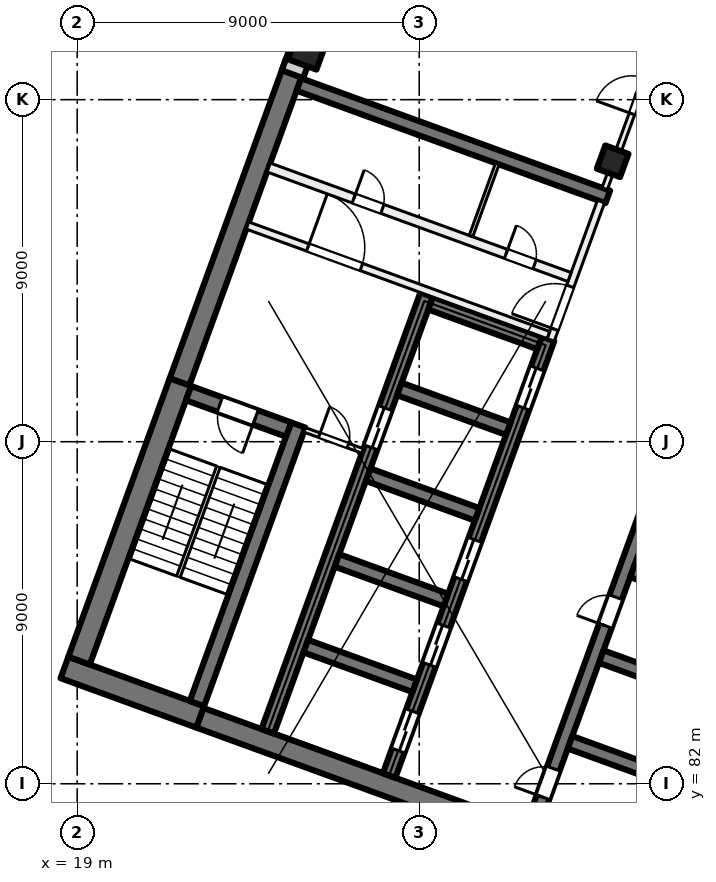
"""IFC4 building model, lengths in metres.
Left out: names, types, materials, properties, quantities, classifications, styles, units other than length and angle.
Written with IfcOpenShell. Run it as: python <this file> out.ifc"""

import sys

from ifc_helpers import new_model, si_unit, direction, frame, frame_2d, origin, origin_2d, place, context, subcontext, project, spatial, rectangle, extrude, element, fill, save


model = new_model("IFC4")
c1 = context("Model", 3, precision=1e-05, world=origin(), true_north=direction((0.0, 1.0)))
c2 = subcontext(c1, "Body", "Model", "MODEL_VIEW")
j1 = project(units=[si_unit("LENGTHUNIT", "METRE"), si_unit("PLANEANGLEUNIT", "RADIAN")], contexts=[c1])
p1 = place(None, origin())
s1 = spatial("IfcSite", under=j1, at=p1, CompositionType="ELEMENT")
p2 = place(p1, origin())
s2 = spatial("IfcBuilding", under=s1, at=p2, CompositionType="ELEMENT")
p3 = place(p2, frame((0.0, 0.0, 134.5)))
s3 = spatial("IfcBuildingStorey", under=s2, at=p3, CompositionType="ELEMENT", Elevation=134.5)
p4 = place(p3, frame((33.091, 98.379, 0.0), z_axis=(0.0, 0.0, 1.0), x_axis=(-0.342020143326, -0.939692620786, 0.0)))
e1 = element("IfcColumn", 1, at=p4, inside=s3, PredefinedType="COLUMN", context=c2, shape_type="SweptSolid", body=[
    extrude(rectangle(XDim=0.65, YDim=0.65, at=origin_2d()), origin(), (0.0, 0.0, 1.0), 4.0),
])
p5 = place(p3, frame((25.056, 101.303, 0.0), z_axis=(0.0, 0.0, 1.0), x_axis=(-0.342020143326, -0.939692620786, 0.0)))
e2 = element("IfcColumn", 2, at=p5, inside=s3, PredefinedType="COLUMN", context=c2, shape_type="SweptSolid", body=[
    extrude(rectangle(XDim=0.8, YDim=0.8, at=origin_2d()), origin(), (0.0, 0.0, 1.0), 4.0),
])
p6 = place(p3, frame((35.759, 78.811, 0.0), z_axis=(0.0, 0.0, 1.0), x_axis=(-0.939692894512, 0.342019391267, 0.0)))
e3 = element("IfcWall", 3, at=p6, inside=s3, PredefinedType="SHEAR", context=c2, shape_type="SweptSolid", body=[
    extrude(rectangle(XDim=14.4, YDim=0.55, at=frame_2d((7.2, 0.0))), origin(), (0.0, 0.0, 1.0), 4.0),
])
p7 = place(p3, frame((22.236, 83.76, 0.0), z_axis=(0.0, 0.0, 1.0), x_axis=(-0.939680822529, 0.342052557032, 0.0)))
e4 = element("IfcWall", 4, at=p7, inside=s3, PredefinedType="SHEAR", context=c2, shape_type="SweptSolid", body=[
    extrude(rectangle(XDim=3.8, YDim=0.6, at=frame_2d((1.9, 0.0))), origin(), (0.0, 0.0, 1.0), 4.0),
])
p8 = place(p3, frame((19.05, 85.239, 0.0), z_axis=(0.0, 0.0, 1.0), x_axis=(0.342016982193, 0.939693771338, 0.0)))
e5 = element("IfcWall", 5, at=p8, inside=s3, PredefinedType="SHEAR", context=c2, shape_type="SweptSolid", body=[
    extrude(rectangle(XDim=7.8, YDim=0.6, at=frame_2d((3.9, 0.0))), origin(), (0.0, 0.0, 1.0), 4.0),
])
p9 = place(p3, frame((21.694, 92.577, 0.0), z_axis=(0.0, 0.0, 1.0), x_axis=(0.342010253184, 0.939696220444, 0.0)))
e6 = element("IfcWall", 6, at=p9, inside=s3, PredefinedType="SHEAR", context=c2, shape_type="SweptSolid", body=[
    extrude(rectangle(XDim=8.95, YDim=0.55, at=frame_2d((4.475, 0.0))), origin(), (0.0, 0.0, 1.0), 4.0),
])
p10 = place(p3, frame((22.15, 84.11, 0.0), z_axis=(0.0, 0.0, 1.0), x_axis=(0.342016982193, 0.939693771338, 0.0)))
e7 = element("IfcWall", 7, at=p10, inside=s3, PredefinedType="SHEAR", context=c2, shape_type="SweptSolid", body=[
    extrude(rectangle(XDim=7.8, YDim=0.4, at=frame_2d((3.9, 0.0))), origin(), (0.0, 0.0, 1.0), 4.0),
])
p11 = place(p3, frame((24.562, 91.32, 0.0), z_axis=(0.0, 0.0, 1.0), x_axis=(-0.939717030584, 0.341953070509, 0.0)))
e8 = element("IfcWall", 8, at=p11, inside=s3, PredefinedType="SHEAR", context=c2, shape_type="SweptSolid", body=[
    extrude(rectangle(XDim=2.8, YDim=0.4, at=frame_2d((1.4, 0.0))), origin(), (0.0, 0.0, 1.0), 4.0),
])
p12 = place(p11, frame((0.925, 0.0, 0.0)))
e9 = element("IfcOpeningElement", 9, at=p12, cuts=e8, PredefinedType="OPENING", context=c2, shape_type="SweptSolid", body=[
    extrude(rectangle(XDim=1.0, YDim=2.1, at=frame_2d((0.5, 1.05))), frame((0.0, 0.21, 0.0), z_axis=(0.0, -1.0, 0.0), x_axis=(1.0, 0.0, 0.0)), (0.0, 0.0, 1.0), 0.42),
])
p13 = place(p3, frame((30.967, 80.848, 0.0), z_axis=(0.0, 0.0, 1.0), x_axis=(0.34201563943, 0.939694260058, 0.0)))
e10 = element("IfcWall", 10, at=p13, inside=s3, PredefinedType="SHEAR", context=c2, shape_type="SweptSolid", body=[
    extrude(rectangle(XDim=12.225, YDim=0.35, at=frame_2d((6.113, 0.0))), origin(), (0.0, 0.0, 1.0), 4.0),
])
p14 = place(p13, frame((0.85, 0.0, 0.0)))
e11 = element("IfcOpeningElement", 11, at=p14, cuts=e10, PredefinedType="OPENING", context=c2, shape_type="SweptSolid", body=[
    extrude(rectangle(XDim=0.8, YDim=2.1, at=frame_2d((0.4, 1.05))), frame((0.0, 0.185, 0.0), z_axis=(0.0, -1.0, 0.0), x_axis=(1.0, 0.0, 0.0)), (0.0, 0.0, 1.0), 0.37),
])
p15 = place(p13, frame((5.65, 0.0, 0.0)))
e12 = element("IfcOpeningElement", 12, at=p15, cuts=e10, PredefinedType="OPENING", context=c2, shape_type="SweptSolid", body=[
    extrude(rectangle(XDim=0.8, YDim=2.1, at=frame_2d((0.4, 1.05))), frame((0.0, 0.185, 0.0), z_axis=(0.0, -1.0, 0.0), x_axis=(1.0, 0.0, 0.0)), (0.0, 0.0, 1.0), 0.37),
])
p16 = place(p3, frame((34.835, 82.047, 0.0), z_axis=(0.0, 0.0, 1.0), x_axis=(-0.939683528043, 0.3420451244, 0.0)))
e13 = element("IfcWall", 13, at=p16, inside=s3, PredefinedType="SHEAR", context=c2, shape_type="SweptSolid", body=[
    extrude(rectangle(XDim=3.05, YDim=0.35, at=frame_2d((1.525, 0.0))), origin(), (0.0, 0.0, 1.0), 4.0),
])
p17 = place(p3, frame((35.656, 84.303, 0.0), z_axis=(0.0, 0.0, 1.0), x_axis=(-0.939709254651, 0.341974438698, 0.0)))
e14 = element("IfcWall", 14, at=p17, inside=s3, PredefinedType="SHEAR", context=c2, shape_type="SweptSolid", body=[
    extrude(rectangle(XDim=3.05, YDim=0.35, at=frame_2d((1.525, 0.0))), origin(), (0.0, 0.0, 1.0), 4.0),
])
p18 = place(p3, frame((36.477, 86.558, 0.0), z_axis=(0.0, 0.0, 1.0), x_axis=(-0.939683528043, 0.3420451244, 0.0)))
e15 = element("IfcWall", 15, at=p18, inside=s3, PredefinedType="SHEAR", context=c2, shape_type="SweptSolid", body=[
    extrude(rectangle(XDim=3.05, YDim=0.35, at=frame_2d((1.525, 0.0))), origin(), (0.0, 0.0, 1.0), 4.0),
])
p19 = place(p3, frame((27.208, 82.216, 0.0), z_axis=(0.0, 0.0, 1.0), x_axis=(0.34201563943, 0.939694260058, 0.0)))
e16 = element("IfcWall", 16, at=p19, inside=s3, PredefinedType="SHEAR", context=c2, shape_type="SweptSolid", body=[
    extrude(rectangle(XDim=12.225, YDim=0.35, at=frame_2d((6.113, 0.0))), origin(), (0.0, 0.0, 1.0), 4.0),
])
p20 = place(p19, frame((0.7, 0.0, 0.0)))
e17 = element("IfcOpeningElement", 17, at=p20, cuts=e16, PredefinedType="OPENING", context=c2, shape_type="SweptSolid", body=[
    extrude(rectangle(XDim=1.1, YDim=2.1, at=frame_2d((0.55, 1.05))), frame((0.0, 0.185, 0.0), z_axis=(0.0, -1.0, 0.0), x_axis=(1.0, 0.0, 0.0)), (0.0, 0.0, 1.0), 0.37),
])
p21 = place(p19, frame((3.1, 0.0, 0.0)))
e18 = element("IfcOpeningElement", 18, at=p21, cuts=e16, PredefinedType="OPENING", context=c2, shape_type="SweptSolid", body=[
    extrude(rectangle(XDim=1.1, YDim=2.1, at=frame_2d((0.55, 1.05))), frame((0.0, 0.185, 0.0), z_axis=(0.0, -1.0, 0.0), x_axis=(1.0, 0.0, 0.0)), (0.0, 0.0, 1.0), 0.37),
])
p22 = place(p19, frame((5.5, 0.0, 0.0)))
e19 = element("IfcOpeningElement", 19, at=p22, cuts=e16, PredefinedType="OPENING", context=c2, shape_type="SweptSolid", body=[
    extrude(rectangle(XDim=1.1, YDim=2.1, at=frame_2d((0.55, 1.05))), frame((0.0, 0.185, 0.0), z_axis=(0.0, -1.0, 0.0), x_axis=(1.0, 0.0, 0.0)), (0.0, 0.0, 1.0), 0.37),
])
p23 = place(p19, frame((10.3, 0.0, 0.0)))
e20 = element("IfcOpeningElement", 20, at=p23, cuts=e16, PredefinedType="OPENING", context=c2, shape_type="SweptSolid", body=[
    extrude(rectangle(XDim=1.1, YDim=2.1, at=frame_2d((0.55, 1.05))), frame((0.0, 0.185, 0.0), z_axis=(0.0, -1.0, 0.0), x_axis=(1.0, 0.0, 0.0)), (0.0, 0.0, 1.0), 0.37),
])
p24 = place(p3, frame((24.013, 83.379, 0.0), z_axis=(0.0, 0.0, 1.0), x_axis=(0.34201563943, 0.939694260058, 0.0)))
e21 = element("IfcWall", 21, at=p24, inside=s3, PredefinedType="SHEAR", context=c2, shape_type="SweptSolid", body=[
    extrude(rectangle(XDim=12.225, YDim=0.35, at=frame_2d((6.113, 0.0))), origin(), (0.0, 0.0, 1.0), 4.0),
])
p25 = place(p24, frame((7.95, 0.0, 0.0)))
e22 = element("IfcOpeningElement", 22, at=p25, cuts=e21, PredefinedType="OPENING", context=c2, shape_type="SweptSolid", body=[
    extrude(rectangle(XDim=1.1, YDim=2.1, at=frame_2d((0.55, 1.05))), frame((0.0, 0.185, 0.0), z_axis=(0.0, -1.0, 0.0), x_axis=(1.0, 0.0, 0.0)), (0.0, 0.0, 1.0), 0.37),
])
for number, where, z_axis, x_axis in (
    (23, (27.881, 84.578, 0.0), (0.0, 0.0, 1.0), (-0.94, 0.342, 0.0)),
    (24, (28.702, 86.833, 0.0), (0.0, 0.0, 1.0), (-0.94, 0.342, 0.0)),
    (25, (29.523, 89.089, 0.0), (0.0, 0.0, 1.0), (-0.94, 0.342, 0.0)),
):
    element("IfcWall", number, at=place(p3, frame(where, z_axis=z_axis, x_axis=x_axis)), inside=s3, PredefinedType="SHEAR", context=c2, shape_type="SweptSolid", body=[
        extrude(rectangle(XDim=3.05, YDim=0.35, at=frame_2d((1.525, 0.0))), origin(), (0.0, 0.0, 1.0), 4.0),
    ])
p26 = place(p3, frame((30.344, 91.344, 0.0), z_axis=(0.0, 0.0, 1.0), x_axis=(-0.939709254651, 0.341974438698, 0.0)))
e26 = element("IfcWall", 26, at=p26, inside=s3, PredefinedType="SHEAR", context=c2, shape_type="SweptSolid", body=[
    extrude(rectangle(XDim=3.05, YDim=0.35, at=frame_2d((1.525, 0.0))), origin(), (0.0, 0.0, 1.0), 4.0),
])
p27 = place(p3, frame((31.165, 93.599, 0.0), z_axis=(0.0, 0.0, 1.0), x_axis=(-0.939683528043, 0.3420451244, 0.0)))
e27 = element("IfcWall", 27, at=p27, inside=s3, PredefinedType="SHEAR", context=c2, shape_type="SweptSolid", body=[
    extrude(rectangle(XDim=3.05, YDim=0.35, at=frame_2d((1.525, 0.0))), origin(), (0.0, 0.0, 1.0), 4.0),
])
p28 = place(p3, frame((32.962, 97.441, 0.0), z_axis=(0.0, 0.0, 1.0), x_axis=(-0.939689545667, 0.342028592028, 0.0)))
e28 = element("IfcWall", 28, at=p28, inside=s3, PredefinedType="SHEAR", context=c2, shape_type="SweptSolid", body=[
    extrude(rectangle(XDim=8.65, YDim=0.35, at=frame_2d((4.325, 0.0))), origin(), (0.0, 0.0, 1.0), 4.0),
])
p29 = place(p3, frame((24.666, 100.669, 0.0), z_axis=(0.0, 0.0, 1.0), x_axis=(0.34201964167, 0.939692803373, 0.0)))
e29 = element("IfcWall", 29, at=p29, inside=s3, PredefinedType="SOLIDWALL", context=c2, shape_type="SweptSolid", body=[
    extrude(rectangle(XDim=32.884, YDim=0.6, at=frame_2d((16.442, 0.0))), origin(), (0.0, 0.0, 1.0), 3.625),
])
p30 = place(p29, frame((1.48, 0.0, 0.9)))
e30 = element("IfcOpeningElement", 30, at=p30, cuts=e29, PredefinedType="OPENING", context=c2, shape_type="SweptSolid", body=[
    extrude(rectangle(XDim=3.0, YDim=2.4, at=frame_2d((1.5, 1.2))), frame((0.0, 0.31, 0.0), z_axis=(0.0, -1.0, 0.0), x_axis=(1.0, 0.0, 0.0)), (0.0, 0.0, 1.0), 0.62),
])
p31 = place(p29, frame((5.98, 0.0, 0.9)))
e31 = element("IfcOpeningElement", 31, at=p31, cuts=e29, PredefinedType="OPENING", context=c2, shape_type="SweptSolid", body=[
    extrude(rectangle(XDim=3.0, YDim=2.4, at=frame_2d((1.5, 1.2))), frame((0.0, 0.31, 0.0), z_axis=(0.0, -1.0, 0.0), x_axis=(1.0, 0.0, 0.0)), (0.0, 0.0, 1.0), 0.62),
])
p32 = place(p29, frame((10.48, 0.0, 0.9)))
e32 = element("IfcOpeningElement", 32, at=p32, cuts=e29, PredefinedType="OPENING", context=c2, shape_type="SweptSolid", body=[
    extrude(rectangle(XDim=3.0, YDim=2.4, at=frame_2d((1.5, 1.2))), frame((0.0, 0.31, 0.0), z_axis=(0.0, -1.0, 0.0), x_axis=(1.0, 0.0, 0.0)), (0.0, 0.0, 1.0), 0.62),
])
p33 = place(p29, frame((14.98, 0.0, 0.9)))
e33 = element("IfcOpeningElement", 33, at=p33, cuts=e29, PredefinedType="OPENING", context=c2, shape_type="SweptSolid", body=[
    extrude(rectangle(XDim=3.0, YDim=2.4, at=frame_2d((1.5, 1.2))), frame((0.0, 0.31, 0.0), z_axis=(0.0, -1.0, 0.0), x_axis=(1.0, 0.0, 0.0)), (0.0, 0.0, 1.0), 0.62),
])
p34 = place(p29, frame((19.48, 0.0, 0.9)))
e34 = element("IfcOpeningElement", 34, at=p34, cuts=e29, PredefinedType="OPENING", context=c2, shape_type="SweptSolid", body=[
    extrude(rectangle(XDim=3.0, YDim=2.4, at=frame_2d((1.5, 1.2))), frame((0.0, 0.31, 0.0), z_axis=(0.0, -1.0, 0.0), x_axis=(1.0, 0.0, 0.0)), (0.0, 0.0, 1.0), 0.62),
])
p35 = place(p29, frame((23.98, 0.0, 0.9)))
e35 = element("IfcOpeningElement", 35, at=p35, cuts=e29, PredefinedType="OPENING", context=c2, shape_type="SweptSolid", body=[
    extrude(rectangle(XDim=3.0, YDim=2.4, at=frame_2d((1.5, 1.2))), frame((0.0, 0.31, 0.0), z_axis=(0.0, -1.0, 0.0), x_axis=(1.0, 0.0, 0.0)), (0.0, 0.0, 1.0), 0.62),
])
p36 = place(p29, frame((28.48, 0.0, 0.9)))
e36 = element("IfcOpeningElement", 36, at=p36, cuts=e29, PredefinedType="OPENING", context=c2, shape_type="SweptSolid", body=[
    extrude(rectangle(XDim=3.0, YDim=2.4, at=frame_2d((1.5, 1.2))), frame((0.0, 0.31, 0.0), z_axis=(0.0, -1.0, 0.0), x_axis=(1.0, 0.0, 0.0)), (0.0, 0.0, 1.0), 0.62),
])
p37 = place(p3, frame((31.459, 93.678, 0.0), z_axis=(0.0, 0.0, 1.0), x_axis=(0.341985870128, 0.939705094502, 0.0)))
e37 = element("IfcWall", 37, at=p37, inside=s3, PredefinedType="PARTITIONING", context=c2, shape_type="SweptSolid", body=[
    extrude(rectangle(XDim=3.875, YDim=0.2, at=frame_2d((1.938, 0.0))), origin(), (0.0, 0.0, 1.0), 3.625),
])
p38 = place(p37, frame((0.3, 0.0, 0.0)))
e38 = element("IfcOpeningElement", 38, at=p38, cuts=e37, PredefinedType="OPENING", context=c2, shape_type="SweptSolid", body=[
    extrude(rectangle(XDim=1.2, YDim=2.1, at=frame_2d((0.6, 1.05))), frame((0.0, 0.11, 0.0), z_axis=(0.0, -1.0, 0.0), x_axis=(1.0, 0.0, 0.0)), (0.0, 0.0, 1.0), 0.22),
])
p39 = place(p3, frame((23.483, 96.688, 0.0), z_axis=(0.0, 0.0, 1.0), x_axis=(0.939691007314, -0.342024576271, 0.0)))
e39 = element("IfcWall", 39, at=p39, inside=s3, PredefinedType="PARTITIONING", context=c2, shape_type="SweptSolid", body=[
    extrude(rectangle(XDim=8.425, YDim=0.2, at=frame_2d((4.212, 0.0))), origin(), (0.0, 0.0, 1.0), 3.625),
])
p40 = place(p39, frame((1.688, 0.0, 0.0)))
e40 = element("IfcOpeningElement", 40, at=p40, cuts=e39, PredefinedType="OPENING", context=c2, shape_type="SweptSolid", body=[
    extrude(rectangle(XDim=1.5, YDim=2.1, at=frame_2d((0.75, 1.05))), frame((0.0, 0.11, 0.0), z_axis=(0.0, -1.0, 0.0), x_axis=(1.0, 0.0, 0.0)), (0.0, 0.0, 1.0), 0.22),
])
p41 = place(p3, frame((24.039, 98.215, 0.0), z_axis=(0.0, 0.0, 1.0), x_axis=(0.939687617333, -0.342033889887, 0.0)))
e41 = element("IfcWall", 41, at=p41, inside=s3, PredefinedType="PARTITIONING", context=c2, shape_type="SweptSolid", body=[
    extrude(rectangle(XDim=8.425, YDim=0.25, at=frame_2d((4.212, 0.0))), origin(), (0.0, 0.0, 1.0), 3.625),
])
p42 = place(p41, frame((6.647, 0.0, 0.0)))
e42 = element("IfcOpeningElement", 42, at=p42, cuts=e41, PredefinedType="OPENING", context=c2, shape_type="SweptSolid", body=[
    extrude(rectangle(XDim=0.8, YDim=2.1, at=frame_2d((0.4, 1.05))), frame((0.0, 0.135, 0.0), z_axis=(0.0, -1.0, 0.0), x_axis=(1.0, 0.0, 0.0)), (0.0, 0.0, 1.0), 0.27),
])
p43 = place(p41, frame((2.385, 0.0, 0.0)))
e43 = element("IfcOpeningElement", 43, at=p43, cuts=e41, PredefinedType="OPENING", context=c2, shape_type="SweptSolid", body=[
    extrude(rectangle(XDim=0.8, YDim=2.1, at=frame_2d((0.4, 1.05))), frame((0.0, 0.135, 0.0), z_axis=(0.0, -1.0, 0.0), x_axis=(1.0, 0.0, 0.0)), (0.0, 0.0, 1.0), 0.27),
])
p44 = place(p3, frame((24.985, 91.312, 0.0), z_axis=(0.0, 0.0, 1.0), x_axis=(0.939705651352, -0.341984340019, 0.0)))
e44 = element("IfcWall", 44, at=p44, inside=s3, PredefinedType="PARTITIONING", context=c2, shape_type="SweptSolid", body=[
    extrude(rectangle(XDim=1.625, YDim=0.125, at=frame_2d((0.812, 0.0))), origin(), (0.0, 0.0, 1.0), 3.625),
])
p45 = place(p44, frame((0.413, 0.0, 0.0)))
e45 = element("IfcOpeningElement", 45, at=p45, cuts=e44, PredefinedType="OPENING", context=c2, shape_type="SweptSolid", body=[
    extrude(rectangle(XDim=0.8, YDim=2.1, at=frame_2d((0.4, 1.05))), frame((0.0, 0.073, 0.0), z_axis=(0.0, -1.0, 0.0), x_axis=(1.0, 0.0, 0.0)), (0.0, 0.0, 1.0), 0.145),
])
p46 = place(p3, frame((29.362, 96.41, 0.0), z_axis=(0.0, 0.0, 1.0), x_axis=(0.342043138314, 0.939684250976, 0.0)))
e46 = element("IfcWall", 46, at=p46, inside=s3, PredefinedType="PARTITIONING", context=c2, shape_type="SweptSolid", body=[
    extrude(rectangle(XDim=2.025, YDim=0.1, at=frame_2d((1.012, 0.0))), origin(), (0.0, 0.0, 1.0), 3.625),
])
p47 = place(p3, frame((26.736, 105.48, 0.0), z_axis=(0.0, 0.0, 1.0), x_axis=(0.939695108427, -0.342013308511, 0.0)))
e47 = element("IfcWall", 47, at=p47, inside=s3, PredefinedType="PARTITIONING", context=c2, shape_type="SweptSolid", body=[
    extrude(rectangle(XDim=16.9, YDim=0.15, at=frame_2d((8.45, 0.0))), origin(), (0.0, 0.0, 1.0), 3.625),
])
p48 = place(p3, frame((32.881, 97.657, 0.0), z_axis=(0.0, 0.0, 1.0), x_axis=(0.341981688871, 0.939706616172, 0.0)))
e48 = element("IfcWall", 48, at=p48, inside=s3, PredefinedType="PARTITIONING", context=c2, shape_type="SweptSolid", body=[
    extrude(rectangle(XDim=5.175, YDim=0.15, at=frame_2d((2.587, 0.0))), origin(), (0.0, 0.0, 1.0), 3.625),
])
p49 = place(p48, frame((2.098, 0.0, 0.0)))
e49 = element("IfcOpeningElement", 49, at=p49, cuts=e48, PredefinedType="OPENING", context=c2, shape_type="SweptSolid", body=[
    extrude(rectangle(XDim=1.0, YDim=2.1, at=frame_2d((0.5, 1.05))), frame((0.0, 0.085, 0.0), z_axis=(0.0, -1.0, 0.0), x_axis=(1.0, 0.0, 0.0)), (0.0, 0.0, 1.0), 0.17),
])
p50 = place(p20, origin())
e50 = element("IfcDoor", 50, at=p50, inside=s3, OperationType="DOUBLE_DOOR_SLIDING", PredefinedType="DOOR", context=c2, shape_type="SweptSolid", body=[
    extrude(rectangle(XDim=1.1, YDim=2.1, at=frame_2d((0.55, 1.05))), frame((0.0, 0.025, 0.0), z_axis=(0.0, -1.0, 0.0), x_axis=(1.0, 0.0, 0.0)), (0.0, 0.0, 1.0), 0.05),
])
fill(e17, e50)
p51 = place(p21, origin())
e51 = element("IfcDoor", 51, at=p51, inside=s3, OperationType="DOUBLE_DOOR_SLIDING", PredefinedType="DOOR", context=c2, shape_type="SweptSolid", body=[
    extrude(rectangle(XDim=1.1, YDim=2.1, at=frame_2d((0.55, 1.05))), frame((0.0, 0.025, 0.0), z_axis=(0.0, -1.0, 0.0), x_axis=(1.0, 0.0, 0.0)), (0.0, 0.0, 1.0), 0.05),
])
fill(e18, e51)
p52 = place(p22, origin())
e52 = element("IfcDoor", 52, at=p52, inside=s3, OperationType="DOUBLE_DOOR_SLIDING", PredefinedType="DOOR", context=c2, shape_type="SweptSolid", body=[
    extrude(rectangle(XDim=1.1, YDim=2.1, at=frame_2d((0.55, 1.05))), frame((0.0, 0.025, 0.0), z_axis=(0.0, -1.0, 0.0), x_axis=(1.0, 0.0, 0.0)), (0.0, 0.0, 1.0), 0.05),
])
fill(e19, e52)
p53 = place(p23, origin())
e53 = element("IfcDoor", 53, at=p53, inside=s3, OperationType="DOUBLE_DOOR_SLIDING", PredefinedType="DOOR", context=c2, shape_type="SweptSolid", body=[
    extrude(rectangle(XDim=1.1, YDim=2.1, at=frame_2d((0.55, 1.05))), frame((0.0, 0.025, 0.0), z_axis=(0.0, -1.0, 0.0), x_axis=(1.0, 0.0, 0.0)), (0.0, 0.0, 1.0), 0.05),
])
fill(e20, e53)
p54 = place(p14, origin())
e54 = element("IfcDoor", 54, at=p54, inside=s3, OperationType="SINGLE_SWING_LEFT", PredefinedType="DOOR", context=c2, shape_type="SweptSolid", body=[
    extrude(rectangle(XDim=0.8, YDim=2.1, at=frame_2d((0.4, 1.05))), frame((0.0, 0.025, 0.0), z_axis=(0.0, -1.0, 0.0), x_axis=(1.0, 0.0, 0.0)), (0.0, 0.0, 1.0), 0.05),
])
fill(e11, e54)
p55 = place(p15, origin())
e55 = element("IfcDoor", 55, at=p55, inside=s3, OperationType="SINGLE_SWING_RIGHT", PredefinedType="DOOR", context=c2, shape_type="SweptSolid", body=[
    extrude(rectangle(XDim=0.8, YDim=2.1, at=frame_2d((0.4, 1.05))), frame((0.0, 0.025, 0.0), z_axis=(0.0, -1.0, 0.0), x_axis=(1.0, 0.0, 0.0)), (0.0, 0.0, 1.0), 0.05),
])
fill(e12, e55)
p56 = place(p38, origin())
e56 = element("IfcDoor", 56, at=p56, inside=s3, OperationType="DOUBLE_DOOR_SINGLE_SWING", PredefinedType="DOOR", context=c2, shape_type="SweptSolid", body=[
    extrude(rectangle(XDim=1.2, YDim=2.1, at=frame_2d((0.6, 1.05))), frame((0.0, 0.025, 0.0), z_axis=(0.0, -1.0, 0.0), x_axis=(1.0, 0.0, 0.0)), (0.0, 0.0, 1.0), 0.05),
])
fill(e38, e56)
p57 = place(p40, origin())
e57 = element("IfcDoor", 57, at=p57, inside=s3, OperationType="DOUBLE_DOOR_SINGLE_SWING", PredefinedType="DOOR", context=c2, shape_type="SweptSolid", body=[
    extrude(rectangle(XDim=1.5, YDim=2.1, at=frame_2d((0.75, 1.05))), frame((0.0, 0.025, 0.0), z_axis=(0.0, -1.0, 0.0), x_axis=(1.0, 0.0, 0.0)), (0.0, 0.0, 1.0), 0.05),
])
fill(e40, e57)
p58 = place(p12, origin())
e58 = element("IfcDoor", 58, at=p58, inside=s3, OperationType="SINGLE_SWING_LEFT", PredefinedType="DOOR", context=c2, shape_type="SweptSolid", body=[
    extrude(rectangle(XDim=1.0, YDim=2.1, at=frame_2d((0.5, 1.05))), frame((0.0, 0.025, 0.0), z_axis=(0.0, -1.0, 0.0), x_axis=(1.0, 0.0, 0.0)), (0.0, 0.0, 1.0), 0.05),
])
fill(e9, e58)
p59 = place(p45, origin())
e59 = element("IfcDoor", 59, at=p59, inside=s3, OperationType="SINGLE_SWING_RIGHT", PredefinedType="DOOR", context=c2, shape_type="SweptSolid", body=[
    extrude(rectangle(XDim=0.8, YDim=2.1, at=frame_2d((0.4, 1.05))), frame((0.0, 0.025, 0.0), z_axis=(0.0, -1.0, 0.0), x_axis=(1.0, 0.0, 0.0)), (0.0, 0.0, 1.0), 0.05),
])
fill(e45, e59)
p60 = place(p42, origin())
e60 = element("IfcDoor", 60, at=p60, inside=s3, OperationType="SINGLE_SWING_LEFT", PredefinedType="DOOR", context=c2, shape_type="SweptSolid", body=[
    extrude(rectangle(XDim=0.8, YDim=2.1, at=frame_2d((0.4, 1.05))), frame((0.0, 0.025, 0.0), z_axis=(0.0, -1.0, 0.0), x_axis=(1.0, 0.0, 0.0)), (0.0, 0.0, 1.0), 0.05),
])
fill(e42, e60)
p61 = place(p43, origin())
e61 = element("IfcDoor", 61, at=p61, inside=s3, OperationType="SINGLE_SWING_RIGHT", PredefinedType="DOOR", context=c2, shape_type="SweptSolid", body=[
    extrude(rectangle(XDim=0.8, YDim=2.1, at=frame_2d((0.4, 1.05))), frame((0.0, 0.025, 0.0), z_axis=(0.0, -1.0, 0.0), x_axis=(1.0, 0.0, 0.0)), (0.0, 0.0, 1.0), 0.05),
])
fill(e43, e61)
p62 = place(p25, origin())
e62 = element("IfcDoor", 62, at=p62, inside=s3, OperationType="DOUBLE_DOOR_SLIDING", PredefinedType="DOOR", context=c2, shape_type="SweptSolid", body=[
    extrude(rectangle(XDim=1.1, YDim=2.1, at=frame_2d((0.55, 1.05))), frame((0.0, 0.025, 0.0), z_axis=(0.0, -1.0, 0.0), x_axis=(1.0, 0.0, 0.0)), (0.0, 0.0, 1.0), 0.05),
])
fill(e22, e62)
p63 = place(p49, origin())
e63 = element("IfcDoor", 63, at=p63, inside=s3, OperationType="SINGLE_SWING_LEFT", PredefinedType="DOOR", context=c2, shape_type="SweptSolid", body=[
    extrude(rectangle(XDim=1.0, YDim=2.1, at=frame_2d((0.5, 1.05))), frame((0.0, 0.025, 0.0), z_axis=(0.0, -1.0, 0.0), x_axis=(1.0, 0.0, 0.0)), (0.0, 0.0, 1.0), 0.05),
])
fill(e49, e63)
save(model, sys.argv[1])
